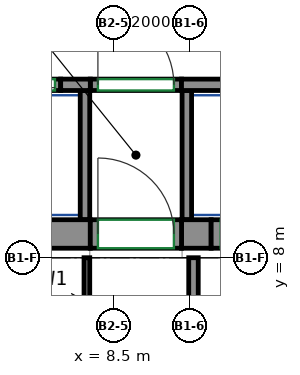
"""IFC4 building model, lengths in metres.
Left out: names, types, materials, properties, quantities, classifications, styles, units other than length and angle.
Written with IfcOpenShell. Run it as: python <this file> out.ifc"""

import sys

from ifc_helpers import new_model, si_unit, direction, frame, frame_2d, origin, place, context, subcontext, project, spatial, rectangle, extrude, source, transform, mapped, element, fill, save


model = new_model("IFC4")
c1 = context("Model", 3, precision=1e-05, world=origin(), true_north=direction((0.0, 1.0)))
c2 = subcontext(c1, "Body", "Model", "MODEL_VIEW")
j1 = project(units=[si_unit("LENGTHUNIT", "METRE"), si_unit("PLANEANGLEUNIT", "RADIAN")], contexts=[c1])
p1 = place(None, origin())
s1 = spatial("IfcSite", under=j1, at=p1, CompositionType="ELEMENT")
p2 = place(p1, origin())
s2 = spatial("IfcBuilding", under=s1, at=p2, CompositionType="ELEMENT")
p3 = place(p2, frame((0.0, 0.0, 216.9)))
s3 = spatial("IfcBuildingStorey", under=s2, at=p3, CompositionType="ELEMENT", Elevation=216.9)
m1 = source(origin(), c2, "Body", "SweptSolid", [
    extrude(rectangle(XDim=14.18, YDim=0.75, at=frame_2d((7.09, 0.0))), origin(), (0.0, 0.0, 1.0), 3.12),
])
p4 = place(p3, frame((-6.29, 8.625, 0.0), z_axis=(0.0, 0.0, 1.0), x_axis=(1.0, 0.0, 0.0)))
e1 = element("IfcWall", 1, at=p4, inside=s3, PredefinedType="SHEAR", context=c2, shape_type="MappedRepresentation", body=[
    mapped(m1, transform((0.0, 0.0, 0.0))),
])
m2 = source(origin(), c2, "Body", "SweptSolid", [
    extrude(rectangle(XDim=0.78, YDim=0.75, at=frame_2d((0.39, 0.0))), origin(), (0.0, 0.0, 1.0), 3.12),
])
p5 = place(p3, frame((10.29, 8.625, 0.0), z_axis=(0.0, 0.0, 1.0), x_axis=(1.0, 0.0, 0.0)))
e2 = element("IfcWall", 2, at=p5, inside=s3, PredefinedType="SHEAR", context=c2, shape_type="MappedRepresentation", body=[
    mapped(m2, transform((0.0, 0.0, 0.0))),
])
m3 = source(origin(), c2, "Body", "SweptSolid", [
    extrude(rectangle(XDim=0.78, YDim=0.3, at=frame_2d((0.39, 0.0))), origin(), (0.0, 0.0, 1.0), 3.12),
])
p6 = place(p3, frame((7.11, 12.55, 0.0), z_axis=(0.0, 0.0, 1.0), x_axis=(1.0, 0.0, 0.0)))
e3 = element("IfcWall", 3, at=p6, inside=s3, PredefinedType="SHEAR", context=c2, shape_type="MappedRepresentation", body=[
    mapped(m3, transform((0.0, 0.0, 0.0))),
])
m4 = source(origin(), c2, "Body", "SweptSolid", [
    extrude(rectangle(XDim=2.82, YDim=0.3, at=frame_2d((1.41, 0.0))), origin(), (0.0, 0.0, 1.0), 3.12),
])
p7 = place(p3, frame((10.29, 12.55, 0.0), z_axis=(0.0, 0.0, 1.0), x_axis=(1.0, 0.0, 0.0)))
e4 = element("IfcWall", 4, at=p7, inside=s3, PredefinedType="SHEAR", context=c2, shape_type="MappedRepresentation", body=[
    mapped(m4, transform((0.0, 0.0, 0.0))),
])
m5 = source(origin(), c2, "Body", "SweptSolid", [
    extrude(rectangle(XDim=1.4, YDim=0.3, at=frame_2d((0.7, 0.0))), origin(), (0.0, 0.0, 1.0), 3.12),
])
p8 = place(p3, frame((5.71, 12.55, 0.0), z_axis=(0.0, 0.0, 1.0), x_axis=(1.0, 0.0, 0.0)))
e5 = element("IfcWall", 5, at=p8, inside=s3, PredefinedType="PARTITIONING", context=c2, shape_type="MappedRepresentation", body=[
    mapped(m5, transform((0.0, 0.0, 0.0))),
])
p9 = place(p8, frame((0.15, 0.0, 0.0)))
e6 = element("IfcOpeningElement", 6, at=p9, cuts=e5, PredefinedType="OPENING", context=c2, shape_type="SweptSolid", body=[
    extrude(rectangle(XDim=1.1, YDim=2.1, at=frame_2d((0.55, 1.05))), frame((0.0, 0.16, 0.0), z_axis=(0.0, -1.0, 0.0), x_axis=(1.0, 0.0, 0.0)), (0.0, 0.0, 1.0), 0.32),
])
m6 = source(origin(), c2, "Body", "SweptSolid", [
    extrude(rectangle(XDim=2.4, YDim=0.3, at=frame_2d((1.2, 0.0))), origin(), (0.0, 0.0, 1.0), 3.12),
])
p10 = place(p3, frame((7.89, 12.55, 0.0), z_axis=(0.0, 0.0, 1.0), x_axis=(1.0, 0.0, 0.0)))
e7 = element("IfcWall", 7, at=p10, inside=s3, PredefinedType="PARTITIONING", context=c2, shape_type="MappedRepresentation", body=[
    mapped(m6, transform((0.0, 0.0, 0.0))),
])
p11 = place(p10, frame((0.2, 0.0, 0.0)))
e8 = element("IfcOpeningElement", 8, at=p11, cuts=e7, PredefinedType="OPENING", context=c2, shape_type="SweptSolid", body=[
    extrude(rectangle(XDim=2.0, YDim=2.1, at=frame_2d((1.0, 1.05))), frame((0.0, 0.16, 0.0), z_axis=(0.0, -1.0, 0.0), x_axis=(1.0, 0.0, 0.0)), (0.0, 0.0, 1.0), 0.32),
])
m7 = source(origin(), c2, "Body", "SweptSolid", [
    extrude(rectangle(XDim=2.65, YDim=0.25, at=frame_2d((1.325, 0.0))), origin(), (0.0, 0.0, 1.0), 3.12),
])
p12 = place(p3, frame((10.605, 5.35, 0.0), z_axis=(0.0, 0.0, 1.0), x_axis=(0.0, 1.0, 0.0)))
e9 = element("IfcWall", 9, at=p12, inside=s3, PredefinedType="PARTITIONING", context=c2, shape_type="MappedRepresentation", body=[
    mapped(m7, transform((0.0, 0.0, 0.0))),
])
m8 = source(origin(), c2, "Body", "SweptSolid", [
    extrude(rectangle(XDim=3.4, YDim=0.25, at=frame_2d((1.7, 0.0))), origin(), (0.0, 0.0, 1.0), 3.12),
])
for number, where, z_axis, x_axis in (
    (10, (10.43, 9.0, 0.0), (0.0, 0.0, 1.0), (0.0, 1.0, 0.0)),
    (11, (7.75, 9.0, 0.0), (0.0, 0.0, 1.0), (0.0, 1.0, 0.0)),
):
    element("IfcWall", number, at=place(p3, frame(where, z_axis=z_axis, x_axis=x_axis)), inside=s3, PredefinedType="PARTITIONING", context=c2, shape_type="MappedRepresentation", body=[
        mapped(m8, transform((0.0, 0.0, 0.0))),
    ])
m9 = source(origin(), c2, "Body", "SweptSolid", [
    extrude(rectangle(XDim=2.4, YDim=0.75, at=frame_2d((1.2, 0.0))), origin(), (0.0, 0.0, 1.0), 2.7),
])
p13 = place(p3, frame((7.89, 8.625, 0.0), z_axis=(0.0, 0.0, 1.0), x_axis=(1.0, 0.0, 0.0)))
e12 = element("IfcWall", 12, at=p13, inside=s3, PredefinedType="PARTITIONING", context=c2, shape_type="MappedRepresentation", body=[
    mapped(m9, transform((0.0, 0.0, 0.0))),
])
p14 = place(p13, frame((0.2, 0.0, 0.0)))
e13 = element("IfcOpeningElement", 13, at=p14, cuts=e12, PredefinedType="OPENING", context=c2, shape_type="SweptSolid", body=[
    extrude(rectangle(XDim=2.0, YDim=2.1, at=frame_2d((1.0, 1.05))), frame((0.0, 0.385, 0.0), z_axis=(0.0, -1.0, 0.0), x_axis=(1.0, 0.0, 0.0)), (0.0, 0.0, 1.0), 0.77),
])
m10 = source(origin(), c2, "Body", "SweptSolid", [
    extrude(rectangle(XDim=1.4, YDim=0.75, at=frame_2d((0.7, 0.0))), origin(), (0.0, 0.0, 1.0), 2.7),
])
p15 = place(p3, frame((11.07, 8.625, 0.0), z_axis=(0.0, 0.0, 1.0), x_axis=(1.0, 0.0, 0.0)))
e14 = element("IfcWall", 14, at=p15, inside=s3, PredefinedType="PARTITIONING", context=c2, shape_type="MappedRepresentation", body=[
    mapped(m10, transform((0.0, 0.0, 0.0))),
])
p16 = place(p15, frame((0.25, 0.0, 0.0)))
e15 = element("IfcOpeningElement", 15, at=p16, cuts=e14, PredefinedType="OPENING", context=c2, shape_type="SweptSolid", body=[
    extrude(rectangle(XDim=0.9, YDim=2.1, at=frame_2d((0.45, 1.05))), frame((0.0, 0.385, 0.0), z_axis=(0.0, -1.0, 0.0), x_axis=(1.0, 0.0, 0.0)), (0.0, 0.0, 1.0), 0.77),
])
p17 = place(p3, frame((7.8, 8.0, 0.0), z_axis=(0.0, 0.0, 1.0), x_axis=(0.0, -1.0, 0.0)))
e16 = element("IfcWall", 16, at=p17, inside=s3, PredefinedType="PARTITIONING", context=c2, shape_type="SweptSolid", body=[
    extrude(rectangle(XDim=2.325, YDim=0.15, at=frame_2d((1.163, 0.0))), origin(), (0.0, 0.0, 1.0), 3.12),
])
p18 = place(p11, origin())
e17 = element("IfcDoor", 17, at=p18, inside=s3, OperationType="DOUBLE_DOOR_SINGLE_SWING", PredefinedType="DOOR", context=c2, shape_type="SweptSolid", body=[
    extrude(rectangle(XDim=2.0, YDim=2.1, at=frame_2d((1.0, 1.05))), frame((0.0, 0.025, 0.0), z_axis=(0.0, -1.0, 0.0), x_axis=(1.0, 0.0, 0.0)), (0.0, 0.0, 1.0), 0.05),
])
fill(e8, e17)
p19 = place(p14, origin())
e18 = element("IfcDoor", 18, at=p19, inside=s3, OperationType="DOUBLE_DOOR_SINGLE_SWING", PredefinedType="DOOR", context=c2, shape_type="SweptSolid", body=[
    extrude(rectangle(XDim=2.0, YDim=2.1, at=frame_2d((1.0, 1.05))), frame((0.0, 0.28, 0.0), z_axis=(0.0, -1.0, 0.0), x_axis=(1.0, 0.0, 0.0)), (0.0, 0.0, 1.0), 0.05),
])
fill(e13, e18)
p20 = place(p9, origin())
e19 = element("IfcDoor", 19, at=p20, inside=s3, OperationType="DOUBLE_DOOR_SLIDING", PredefinedType="DOOR", context=c2, shape_type="SweptSolid", body=[
    extrude(rectangle(XDim=1.1, YDim=2.1, at=frame_2d((0.55, 1.05))), frame((0.0, 0.025, 0.0), z_axis=(0.0, -1.0, 0.0), x_axis=(1.0, 0.0, 0.0)), (0.0, 0.0, 1.0), 0.05),
])
fill(e6, e19)
save(model, sys.argv[1])
